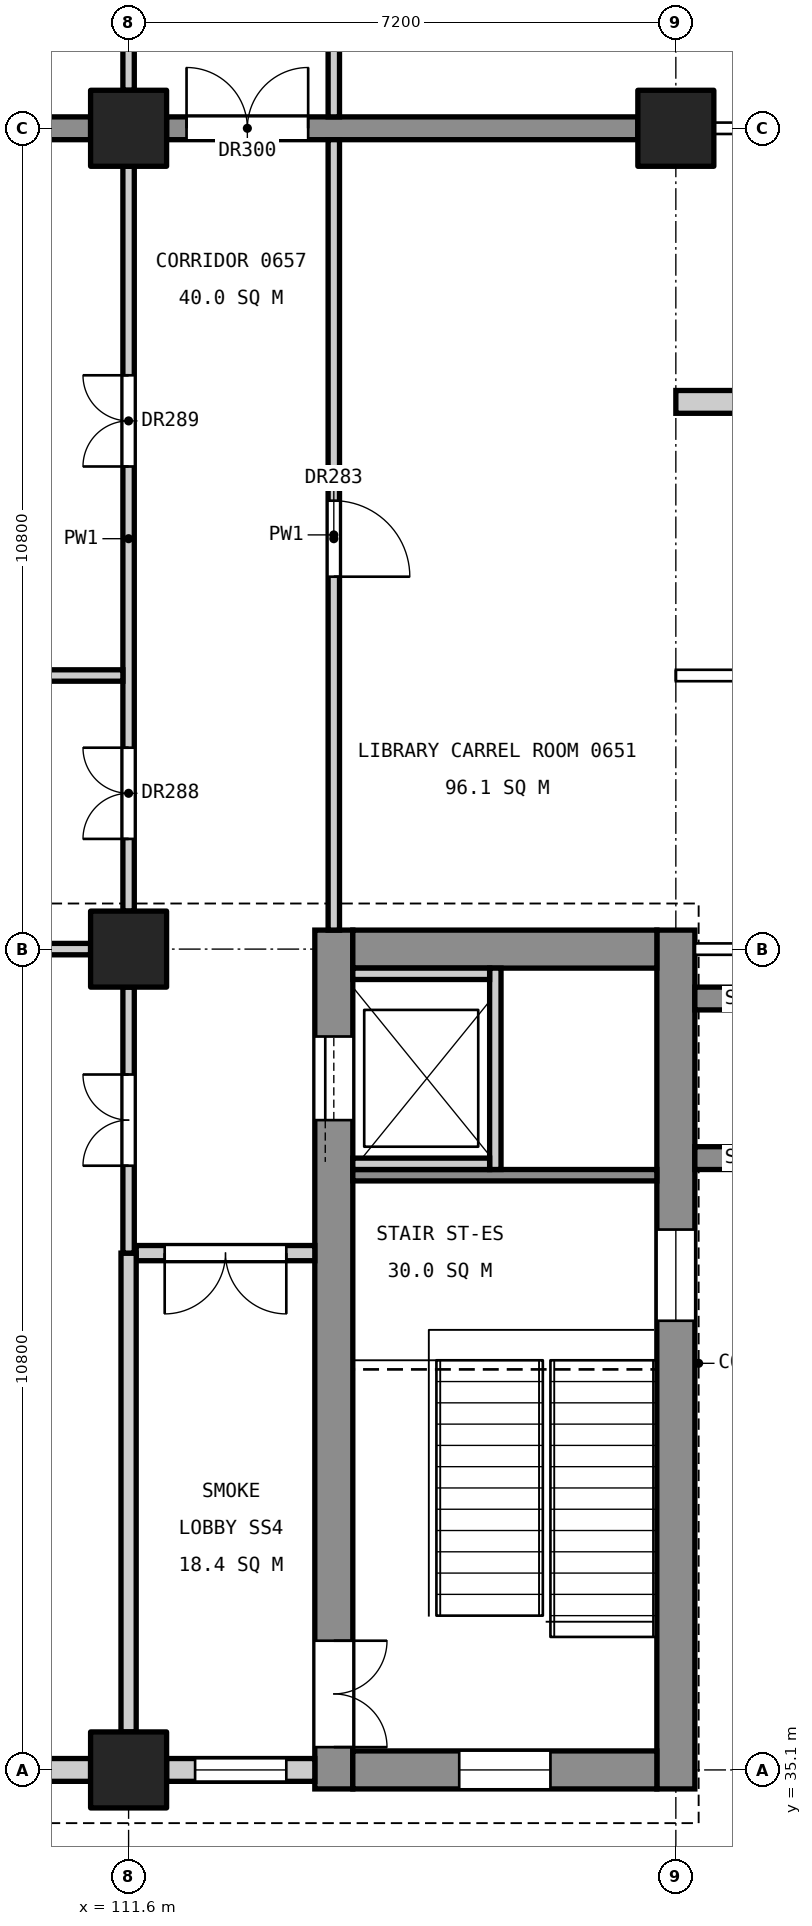
"""IFC4 building model, lengths in metres.
Left out: names, types, materials, properties, quantities, classifications, styles, units other than length and angle.
Written with IfcOpenShell. Run it as: python <this file> out.ifc"""

import sys

from ifc_helpers import new_model, si_unit, direction, frame, frame_2d, origin, origin_2d, place, context, subcontext, project, spatial, rectangle, extrude, element, fill, save


model = new_model("IFC4")
c1 = context("Model", 3, precision=1e-05, world=origin(), true_north=direction((0.0, 1.0)))
c2 = subcontext(c1, "Body", "Model", "MODEL_VIEW")
j1 = project(units=[si_unit("LENGTHUNIT", "METRE"), si_unit("PLANEANGLEUNIT", "RADIAN")], contexts=[c1])
p1 = place(None, origin())
s1 = spatial("IfcSite", under=j1, at=p1, CompositionType="ELEMENT")
p2 = place(p1, origin())
s2 = spatial("IfcBuilding", under=s1, at=p2, CompositionType="ELEMENT")
p3 = place(p2, frame((0.0, 0.0, 31.8)))
s3 = spatial("IfcBuildingStorey", under=s2, at=p3, CompositionType="ELEMENT", Elevation=31.8)
for number, where, z_axis, x_axis in (
    (1, (118.8, 56.7, 0.0), (0.0, 0.0, 1.0), (1.0, 0.0, 0.0)),
    (2, (111.6, 35.1, 0.0), (0.0, 0.0, 1.0), (1.0, 0.0, 0.0)),
    (3, (111.6, 45.9, 0.0), (0.0, 0.0, 1.0), (1.0, 0.0, 0.0)),
    (4, (111.6, 56.7, 0.0), (0.0, 0.0, 1.0), (1.0, 0.0, 0.0)),
):
    element("IfcColumn", number, at=place(p3, frame(where, z_axis=z_axis, x_axis=x_axis)), inside=s3, PredefinedType="COLUMN", context=c2, shape_type="SweptSolid", body=[
        extrude(rectangle(XDim=1.0, YDim=1.0, at=origin_2d()), origin(), (0.0, 0.0, 1.0), 4.8),
    ])
p4 = place(p3, frame((118.8, 34.85, 0.0), z_axis=(0.0, 0.0, 1.0), x_axis=(0.0, 1.0, 0.0)))
e5 = element("IfcWall", 5, at=p4, inside=s3, PredefinedType="SHEAR", context=c2, shape_type="SweptSolid", body=[
    extrude(rectangle(XDim=11.3, YDim=0.5, at=frame_2d((5.65, 0.0))), origin(), (0.0, 0.0, 1.0), 4.55),
])
p5 = place(p4, frame((6.16, 0.0, 3.4)))
e6 = element("IfcOpeningElement", 6, at=p5, cuts=e5, PredefinedType="OPENING", context=c2, shape_type="SweptSolid", body=[
    extrude(rectangle(XDim=1.2, YDim=0.9, at=frame_2d((0.6, 0.45))), frame((0.0, 0.26, 0.0), z_axis=(0.0, -1.0, 0.0), x_axis=(1.0, 0.0, 0.0)), (0.0, 0.0, 1.0), 0.52),
])
p6 = place(p3, frame((114.3, 34.85, 0.0), z_axis=(0.0, 0.0, 1.0), x_axis=(0.0, 1.0, 0.0)))
e7 = element("IfcWall", 7, at=p6, inside=s3, PredefinedType="SHEAR", context=c2, shape_type="SweptSolid", body=[
    extrude(rectangle(XDim=11.3, YDim=0.5, at=frame_2d((5.65, 0.0))), origin(), (0.0, 0.0, 1.0), 4.55),
])
p7 = place(p6, frame((0.55, 0.0, 0.0)))
e8 = element("IfcOpeningElement", 8, at=p7, cuts=e7, PredefinedType="OPENING", context=c2, shape_type="SweptSolid", body=[
    extrude(rectangle(XDim=1.4, YDim=2.1, at=frame_2d((0.7, 1.05))), frame((0.0, 0.26, 0.0), z_axis=(0.0, -1.0, 0.0), x_axis=(1.0, 0.0, 0.0)), (0.0, 0.0, 1.0), 0.52),
])
p8 = place(p6, frame((8.8, 0.0, 0.0)))
e9 = element("IfcOpeningElement", 9, at=p8, cuts=e7, PredefinedType="OPENING", context=c2, shape_type="SweptSolid", body=[
    extrude(rectangle(XDim=1.1, YDim=2.1, at=frame_2d((0.55, 1.05))), frame((0.0, 0.26, 0.0), z_axis=(0.0, -1.0, 0.0), x_axis=(1.0, 0.0, 0.0)), (0.0, 0.0, 1.0), 0.52),
])
p9 = place(p3, frame((118.55, 35.1, 0.0), z_axis=(0.0, 0.0, 1.0), x_axis=(-1.0, 0.0, 0.0)))
e10 = element("IfcWall", 10, at=p9, inside=s3, PredefinedType="SHEAR", context=c2, shape_type="SweptSolid", body=[
    extrude(rectangle(XDim=4.0, YDim=0.5, at=frame_2d((2.0, 0.0))), origin(), (0.0, 0.0, 1.0), 4.55),
])
p10 = place(p9, frame((1.4, 0.0, 3.4)))
e11 = element("IfcOpeningElement", 11, at=p10, cuts=e10, PredefinedType="OPENING", context=c2, shape_type="SweptSolid", body=[
    extrude(rectangle(XDim=1.2, YDim=0.9, at=frame_2d((0.6, 0.45))), frame((0.0, 0.26, 0.0), z_axis=(0.0, -1.0, 0.0), x_axis=(1.0, 0.0, 0.0)), (0.0, 0.0, 1.0), 0.52),
])
p11 = place(p3, frame((118.55, 45.9, 0.0), z_axis=(0.0, 0.0, 1.0), x_axis=(-1.0, 0.0, 0.0)))
e12 = element("IfcWall", 12, at=p11, inside=s3, PredefinedType="SHEAR", context=c2, shape_type="SweptSolid", body=[
    extrude(rectangle(XDim=4.0, YDim=0.5, at=frame_2d((2.0, 0.0))), origin(), (0.0, 0.0, 1.0), 4.55),
])
for number, where, z_axis, x_axis in (
    (13, (119.05, 43.15, 0.0), (0.0, 0.0, 1.0), (1.0, 0.0, 0.0)),
    (14, (119.05, 45.25, 0.0), (0.0, 0.0, 1.0), (1.0, 0.0, 0.0)),
):
    element("IfcWall", number, at=place(p3, frame(where, z_axis=z_axis, x_axis=x_axis)), inside=s3, PredefinedType="SHEAR", context=c2, shape_type="SweptSolid", body=[
        extrude(rectangle(XDim=1.25, YDim=0.3, at=frame_2d((0.625, 0.0))), origin(), (0.0, 0.0, 1.0), 4.8),
    ])
p12 = place(p3, frame((118.3, 56.7, 0.0), z_axis=(0.0, 0.0, 1.0), x_axis=(-1.0, 0.0, 0.0)))
e15 = element("IfcWall", 15, at=p12, inside=s3, PredefinedType="SHEAR", context=c2, shape_type="SweptSolid", body=[
    extrude(rectangle(XDim=6.2, YDim=0.3, at=frame_2d((3.1, 0.0))), origin(), (0.0, 0.0, 1.0), 4.55),
])
p13 = place(p12, frame((4.337, 0.0, 0.0)))
e16 = element("IfcOpeningElement", 16, at=p13, cuts=e15, PredefinedType="OPENING", context=c2, shape_type="SweptSolid", body=[
    extrude(rectangle(XDim=1.6, YDim=2.1, at=frame_2d((0.8, 1.05))), frame((0.0, 0.16, 0.0), z_axis=(0.0, -1.0, 0.0), x_axis=(1.0, 0.0, 0.0)), (0.0, 0.0, 1.0), 0.32),
])
p14 = place(p3, frame((111.1, 56.7, 0.0), z_axis=(0.0, 0.0, 1.0), x_axis=(-1.0, 0.0, 0.0)))
e17 = element("IfcWall", 17, at=p14, inside=s3, PredefinedType="SHEAR", context=c2, shape_type="SweptSolid", body=[
    extrude(rectangle(XDim=9.8, YDim=0.3, at=frame_2d((4.9, 0.0))), origin(), (0.0, 0.0, 1.0), 4.55),
])
p15 = place(p3, frame((118.55, 42.925, 0.0), z_axis=(0.0, 0.0, 1.0), x_axis=(-1.0, 0.0, 0.0)))
e18 = element("IfcWall", 18, at=p15, inside=s3, PredefinedType="SOLIDWALL", context=c2, shape_type="SweptSolid", body=[
    extrude(rectangle(XDim=4.0, YDim=0.15, at=frame_2d((2.0, 0.0))), origin(), (0.0, 0.0, 1.0), 4.55),
])
p16 = place(p3, frame((116.425, 43.0, 0.0), z_axis=(0.0, 0.0, 1.0), x_axis=(0.0, 1.0, 0.0)))
e19 = element("IfcWall", 19, at=p16, inside=s3, PredefinedType="SOLIDWALL", context=c2, shape_type="SweptSolid", body=[
    extrude(rectangle(XDim=2.65, YDim=0.15, at=frame_2d((1.325, 0.0))), origin(), (0.0, 0.0, 1.0), 4.8),
])
for number, where, z_axis, x_axis in (
    (20, (116.35, 43.075, 0.0), (0.0, 0.0, 1.0), (-1.0, 0.0, 0.0)),
    (21, (116.35, 45.575, 0.0), (0.0, 0.0, 1.0), (-1.0, 0.0, 0.0)),
):
    element("IfcWall", number, at=place(p3, frame(where, z_axis=z_axis, x_axis=x_axis)), inside=s3, PredefinedType="SOLIDWALL", context=c2, shape_type="SweptSolid", body=[
        extrude(rectangle(XDim=1.8, YDim=0.15, at=frame_2d((0.9, 0.0))), origin(), (0.0, 0.0, 1.0), 4.8),
    ])
p17 = place(p3, frame((114.05, 35.1, 0.0), z_axis=(0.0, 0.0, 1.0), x_axis=(-1.0, 0.0, 0.0)))
e22 = element("IfcWall", 22, at=p17, inside=s3, PredefinedType="STANDARD", context=c2, shape_type="SweptSolid", body=[
    extrude(rectangle(XDim=1.95, YDim=0.3, at=frame_2d((0.975, 0.0))), origin(), (0.0, 0.0, 1.0), 3.85),
])
p18 = place(p17, frame((0.375, 0.0, 0.9)))
e23 = element("IfcOpeningElement", 23, at=p18, cuts=e22, PredefinedType="OPENING", context=c2, shape_type="SweptSolid", body=[
    extrude(rectangle(XDim=1.2, YDim=2.4, at=frame_2d((0.6, 1.2))), frame((0.0, 0.16, 0.0), z_axis=(0.0, -1.0, 0.0), x_axis=(1.0, 0.0, 0.0)), (0.0, 0.0, 1.0), 0.32),
])
p19 = place(p3, frame((111.1, 35.1, 0.0), z_axis=(0.0, 0.0, 1.0), x_axis=(-1.0, 0.0, 0.0)))
e24 = element("IfcWall", 24, at=p19, inside=s3, PredefinedType="STANDARD", context=c2, shape_type="SweptSolid", body=[
    extrude(rectangle(XDim=9.8, YDim=0.3, at=frame_2d((4.9, 0.0))), origin(), (0.0, 0.0, 1.0), 3.85),
])
p20 = place(p19, frame((0.65, 0.0, 0.9)))
e25 = element("IfcOpeningElement", 25, at=p20, cuts=e24, PredefinedType="OPENING", context=c2, shape_type="SweptSolid", body=[
    extrude(rectangle(XDim=1.8, YDim=2.4, at=frame_2d((0.9, 1.2))), frame((0.0, 0.16, 0.0), z_axis=(0.0, -1.0, 0.0), x_axis=(1.0, 0.0, 0.0)), (0.0, 0.0, 1.0), 0.32),
])
p21 = place(p19, frame((4.525, 0.0, 0.8)))
e26 = element("IfcOpeningElement", 26, at=p21, cuts=e24, PredefinedType="OPENING", context=c2, shape_type="SweptSolid", body=[
    extrude(rectangle(XDim=0.75, YDim=1.2, at=frame_2d((0.375, 0.6))), frame((0.0, 0.16, 0.0), z_axis=(0.0, -1.0, 0.0), x_axis=(1.0, 0.0, 0.0)), (0.0, 0.0, 1.0), 0.32),
])
p22 = place(p19, frame((7.35, 0.0, 0.9)))
e27 = element("IfcOpeningElement", 27, at=p22, cuts=e24, PredefinedType="OPENING", context=c2, shape_type="SweptSolid", body=[
    extrude(rectangle(XDim=1.8, YDim=2.4, at=frame_2d((0.9, 1.2))), frame((0.0, 0.16, 0.0), z_axis=(0.0, -1.0, 0.0), x_axis=(1.0, 0.0, 0.0)), (0.0, 0.0, 1.0), 0.32),
])
p23 = place(p3, frame((123.6, 53.1, 0.0), z_axis=(0.0, 0.0, 1.0), x_axis=(-1.0, 0.0, 0.0)))
e28 = element("IfcWall", 28, at=p23, inside=s3, PredefinedType="STANDARD", context=c2, shape_type="SweptSolid", body=[
    extrude(rectangle(XDim=4.8, YDim=0.3, at=frame_2d((2.4, 0.0))), origin(), (0.0, 0.0, 1.0), 3.65),
])
p24 = place(p3, frame((114.3, 46.15, 0.0), z_axis=(0.0, 0.0, 1.0), x_axis=(0.0, 1.0, 0.0)))
e29 = element("IfcWall", 29, at=p24, inside=s3, PredefinedType="PARTITIONING", context=c2, shape_type="SweptSolid", body=[
    extrude(rectangle(XDim=10.4, YDim=0.15, at=frame_2d((5.2, 0.0))), origin(), (0.0, 0.0, 1.0), 3.55),
])
p25 = place(p24, frame((4.65, 0.0, 0.0)))
e30 = element("IfcOpeningElement", 30, at=p25, cuts=e29, PredefinedType="OPENING", context=c2, shape_type="SweptSolid", body=[
    extrude(rectangle(XDim=1.0, YDim=2.1, at=frame_2d((0.5, 1.05))), frame((0.0, 0.085, 0.0), z_axis=(0.0, -1.0, 0.0), x_axis=(1.0, 0.0, 0.0)), (0.0, 0.0, 1.0), 0.17),
])
p26 = place(p3, frame((114.3, 56.85, 0.0), z_axis=(0.0, 0.0, 1.0), x_axis=(0.0, 1.0, 0.0)))
e31 = element("IfcWall", 31, at=p26, inside=s3, PredefinedType="PARTITIONING", context=c2, shape_type="SweptSolid", body=[
    extrude(rectangle(XDim=3.2, YDim=0.15, at=frame_2d((1.6, 0.0))), origin(), (0.0, 0.0, 1.0), 3.55),
])
p27 = place(p26, frame((1.15, 0.0, 0.0)))
e32 = element("IfcOpeningElement", 32, at=p27, cuts=e31, PredefinedType="OPENING", context=c2, shape_type="SweptSolid", body=[
    extrude(rectangle(XDim=1.0, YDim=2.1, at=frame_2d((0.5, 1.05))), frame((0.0, 0.085, 0.0), z_axis=(0.0, -1.0, 0.0), x_axis=(1.0, 0.0, 0.0)), (0.0, 0.0, 1.0), 0.17),
])
p28 = place(p3, frame((114.05, 41.9, 0.0), z_axis=(0.0, 0.0, 1.0), x_axis=(-1.0, 0.0, 0.0)))
e33 = element("IfcWall", 33, at=p28, inside=s3, PredefinedType="PARTITIONING", context=c2, shape_type="SweptSolid", body=[
    extrude(rectangle(XDim=2.35, YDim=0.2, at=frame_2d((1.175, 0.0))), origin(), (0.0, 0.0, 1.0), 3.55),
])
p29 = place(p28, frame((0.375, 0.0, 0.0)))
e34 = element("IfcOpeningElement", 34, at=p29, cuts=e33, PredefinedType="OPENING", context=c2, shape_type="SweptSolid", body=[
    extrude(rectangle(XDim=1.6, YDim=2.1, at=frame_2d((0.8, 1.05))), frame((0.0, 0.11, 0.0), z_axis=(0.0, -1.0, 0.0), x_axis=(1.0, 0.0, 0.0)), (0.0, 0.0, 1.0), 0.22),
])
p30 = place(p3, frame((111.6, 35.6, 0.0), z_axis=(0.0, 0.0, 1.0), x_axis=(0.0, 1.0, 0.0)))
e35 = element("IfcWall", 35, at=p30, inside=s3, PredefinedType="PARTITIONING", context=c2, shape_type="SweptSolid", body=[
    extrude(rectangle(XDim=6.3, YDim=0.2, at=frame_2d((3.15, 0.0))), origin(), (0.0, 0.0, 1.0), 3.55),
])
p31 = place(p3, frame((111.6, 41.9, 0.0), z_axis=(0.0, 0.0, 1.0), x_axis=(0.0, 1.0, 0.0)))
e36 = element("IfcWall", 36, at=p31, inside=s3, PredefinedType="PARTITIONING", context=c2, shape_type="SweptSolid", body=[
    extrude(rectangle(XDim=3.5, YDim=0.15, at=frame_2d((1.75, 0.0))), origin(), (0.0, 0.0, 1.0), 3.55),
])
p32 = place(p31, frame((1.15, 0.0, 0.0)))
e37 = element("IfcOpeningElement", 37, at=p32, cuts=e36, PredefinedType="OPENING", context=c2, shape_type="SweptSolid", body=[
    extrude(rectangle(XDim=1.2, YDim=2.1, at=frame_2d((0.6, 1.05))), frame((0.0, 0.085, 0.0), z_axis=(0.0, -1.0, 0.0), x_axis=(1.0, 0.0, 0.0)), (0.0, 0.0, 1.0), 0.17),
])
p33 = place(p3, frame((111.6, 46.4, 0.0), z_axis=(0.0, 0.0, 1.0), x_axis=(0.0, 1.0, 0.0)))
e38 = element("IfcWall", 38, at=p33, inside=s3, PredefinedType="PARTITIONING", context=c2, shape_type="SweptSolid", body=[
    extrude(rectangle(XDim=9.8, YDim=0.15, at=frame_2d((4.9, 0.0))), origin(), (0.0, 0.0, 1.0), 3.55),
])
p34 = place(p33, frame((0.95, 0.0, 0.0)))
e39 = element("IfcOpeningElement", 39, at=p34, cuts=e38, PredefinedType="OPENING", context=c2, shape_type="SweptSolid", body=[
    extrude(rectangle(XDim=1.2, YDim=2.1, at=frame_2d((0.6, 1.05))), frame((0.0, 0.085, 0.0), z_axis=(0.0, -1.0, 0.0), x_axis=(1.0, 0.0, 0.0)), (0.0, 0.0, 1.0), 0.17),
])
p35 = place(p33, frame((5.85, 0.0, 0.0)))
e40 = element("IfcOpeningElement", 40, at=p35, cuts=e38, PredefinedType="OPENING", context=c2, shape_type="SweptSolid", body=[
    extrude(rectangle(XDim=1.2, YDim=2.1, at=frame_2d((0.6, 1.05))), frame((0.0, 0.085, 0.0), z_axis=(0.0, -1.0, 0.0), x_axis=(1.0, 0.0, 0.0)), (0.0, 0.0, 1.0), 0.17),
])
p36 = place(p3, frame((111.6, 57.2, 0.0), z_axis=(0.0, 0.0, 1.0), x_axis=(0.0, 1.0, 0.0)))
e41 = element("IfcWall", 41, at=p36, inside=s3, PredefinedType="PARTITIONING", context=c2, shape_type="SweptSolid", body=[
    extrude(rectangle(XDim=3.1, YDim=0.15, at=frame_2d((1.55, 0.0))), origin(), (0.0, 0.0, 1.0), 3.55),
])
p37 = place(p36, frame((0.95, 0.0, 0.0)))
e42 = element("IfcOpeningElement", 42, at=p37, cuts=e41, PredefinedType="OPENING", context=c2, shape_type="SweptSolid", body=[
    extrude(rectangle(XDim=1.2, YDim=2.1, at=frame_2d((0.6, 1.05))), frame((0.0, 0.085, 0.0), z_axis=(0.0, -1.0, 0.0), x_axis=(1.0, 0.0, 0.0)), (0.0, 0.0, 1.0), 0.17),
])
p38 = place(p3, frame((111.1, 45.9, 0.0), z_axis=(0.0, 0.0, 1.0), x_axis=(-1.0, 0.0, 0.0)))
e43 = element("IfcWall", 43, at=p38, inside=s3, PredefinedType="PARTITIONING", context=c2, shape_type="SweptSolid", body=[
    extrude(rectangle(XDim=9.8, YDim=0.15, at=frame_2d((4.9, 0.0))), origin(), (0.0, 0.0, 1.0), 3.85),
])
p39 = place(p3, frame((111.525, 49.5, 0.0), z_axis=(0.0, 0.0, 1.0), x_axis=(-1.0, 0.0, 0.0)))
e44 = element("IfcWall", 44, at=p39, inside=s3, PredefinedType="PARTITIONING", context=c2, shape_type="SweptSolid", body=[
    extrude(rectangle(XDim=10.575, YDim=0.15, at=frame_2d((5.288, 0.0))), origin(), (0.0, 0.0, 1.0), 3.85),
])
p40 = place(p7, frame((1.4, 0.0, 0.0), z_axis=(0.0, 0.0, 1.0), x_axis=(-1.0, 0.0, 0.0)))
e45 = element("IfcDoor", 45, at=p40, inside=s3, OperationType="DOUBLE_DOOR_SINGLE_SWING", PredefinedType="DOOR", context=c2, shape_type="SweptSolid", body=[
    extrude(rectangle(XDim=1.4, YDim=2.1, at=frame_2d((0.7, 1.05))), frame((0.0, 0.025, 0.0), z_axis=(0.0, -1.0, 0.0), x_axis=(1.0, 0.0, 0.0)), (0.0, 0.0, 1.0), 0.05),
])
fill(e8, e45)
p41 = place(p8, origin())
e46 = element("IfcDoor", 46, at=p41, inside=s3, OperationType="SLIDING_TO_LEFT", PredefinedType="DOOR", context=c2, shape_type="SweptSolid", body=[
    extrude(rectangle(XDim=1.1, YDim=2.1, at=frame_2d((0.55, 1.05))), frame((0.0, 0.025, 0.0), z_axis=(0.0, -1.0, 0.0), x_axis=(1.0, 0.0, 0.0)), (0.0, 0.0, 1.0), 0.05),
])
fill(e9, e46)
p42 = place(p18, origin())
e47 = element("IfcWindow", 47, at=p42, inside=s3, PartitioningType="SINGLE_PANEL", PredefinedType="WINDOW", context=c2, shape_type="SweptSolid", body=[
    extrude(rectangle(XDim=1.2, YDim=2.4, at=frame_2d((0.6, 1.2))), frame((0.0, 0.03, 0.0), z_axis=(0.0, -1.0, 0.0), x_axis=(1.0, 0.0, 0.0)), (0.0, 0.0, 1.0), 0.06),
])
fill(e23, e47)
p43 = place(p5, origin())
e48 = element("IfcWindow", 48, at=p43, inside=s3, PartitioningType="SINGLE_PANEL", PredefinedType="WINDOW", context=c2, shape_type="SweptSolid", body=[
    extrude(rectangle(XDim=1.2, YDim=0.9, at=frame_2d((0.6, 0.45))), frame((0.0, 0.03, 0.0), z_axis=(0.0, -1.0, 0.0), x_axis=(1.0, 0.0, 0.0)), (0.0, 0.0, 1.0), 0.06),
])
fill(e6, e48)
p44 = place(p10, origin())
e49 = element("IfcWindow", 49, at=p44, inside=s3, PartitioningType="SINGLE_PANEL", PredefinedType="WINDOW", context=c2, shape_type="SweptSolid", body=[
    extrude(rectangle(XDim=1.2, YDim=0.9, at=frame_2d((0.6, 0.45))), frame((0.0, 0.03, 0.0), z_axis=(0.0, -1.0, 0.0), x_axis=(1.0, 0.0, 0.0)), (0.0, 0.0, 1.0), 0.06),
])
fill(e11, e49)
p45 = place(p25, frame((1.0, 0.0, 0.0), z_axis=(0.0, 0.0, 1.0), x_axis=(-1.0, 0.0, 0.0)))
e50 = element("IfcDoor", 50, at=p45, inside=s3, OperationType="SINGLE_SWING_RIGHT", PredefinedType="DOOR", context=c2, shape_type="SweptSolid", body=[
    extrude(rectangle(XDim=1.0, YDim=2.1, at=frame_2d((0.5, 1.05))), frame((0.0, 0.025, 0.0), z_axis=(0.0, -1.0, 0.0), x_axis=(1.0, 0.0, 0.0)), (0.0, 0.0, 1.0), 0.05),
])
fill(e30, e50)
p46 = place(p32, origin())
e51 = element("IfcDoor", 51, at=p46, inside=s3, OperationType="DOUBLE_DOOR_SINGLE_SWING", PredefinedType="DOOR", context=c2, shape_type="SweptSolid", body=[
    extrude(rectangle(XDim=1.2, YDim=2.1, at=frame_2d((0.6, 1.05))), frame((0.0, 0.025, 0.0), z_axis=(0.0, -1.0, 0.0), x_axis=(1.0, 0.0, 0.0)), (0.0, 0.0, 1.0), 0.05),
])
fill(e37, e51)
p47 = place(p34, origin())
e52 = element("IfcDoor", 52, at=p47, inside=s3, OperationType="DOUBLE_DOOR_SINGLE_SWING", PredefinedType="DOOR", context=c2, shape_type="SweptSolid", body=[
    extrude(rectangle(XDim=1.2, YDim=2.1, at=frame_2d((0.6, 1.05))), frame((0.0, 0.025, 0.0), z_axis=(0.0, -1.0, 0.0), x_axis=(1.0, 0.0, 0.0)), (0.0, 0.0, 1.0), 0.05),
])
fill(e39, e52)
p48 = place(p35, origin())
e53 = element("IfcDoor", 53, at=p48, inside=s3, OperationType="DOUBLE_DOOR_SINGLE_SWING", PredefinedType="DOOR", context=c2, shape_type="SweptSolid", body=[
    extrude(rectangle(XDim=1.2, YDim=2.1, at=frame_2d((0.6, 1.05))), frame((0.0, 0.025, 0.0), z_axis=(0.0, -1.0, 0.0), x_axis=(1.0, 0.0, 0.0)), (0.0, 0.0, 1.0), 0.05),
])
fill(e40, e53)
p49 = place(p29, origin())
e54 = element("IfcDoor", 54, at=p49, inside=s3, OperationType="DOUBLE_DOOR_SINGLE_SWING", PredefinedType="DOOR", context=c2, shape_type="SweptSolid", body=[
    extrude(rectangle(XDim=1.6, YDim=2.1, at=frame_2d((0.8, 1.05))), frame((0.0, 0.025, 0.0), z_axis=(0.0, -1.0, 0.0), x_axis=(1.0, 0.0, 0.0)), (0.0, 0.0, 1.0), 0.05),
])
fill(e34, e54)
p50 = place(p13, frame((1.6, 0.0, 0.0), z_axis=(0.0, 0.0, 1.0), x_axis=(-1.0, 0.0, 0.0)))
e55 = element("IfcDoor", 55, at=p50, inside=s3, OperationType="DOUBLE_DOOR_SINGLE_SWING", PredefinedType="DOOR", context=c2, shape_type="SweptSolid", body=[
    extrude(rectangle(XDim=1.6, YDim=2.1, at=frame_2d((0.8, 1.05))), frame((0.0, 0.025, 0.0), z_axis=(0.0, -1.0, 0.0), x_axis=(1.0, 0.0, 0.0)), (0.0, 0.0, 1.0), 0.05),
])
fill(e16, e55)
save(model, sys.argv[1])
